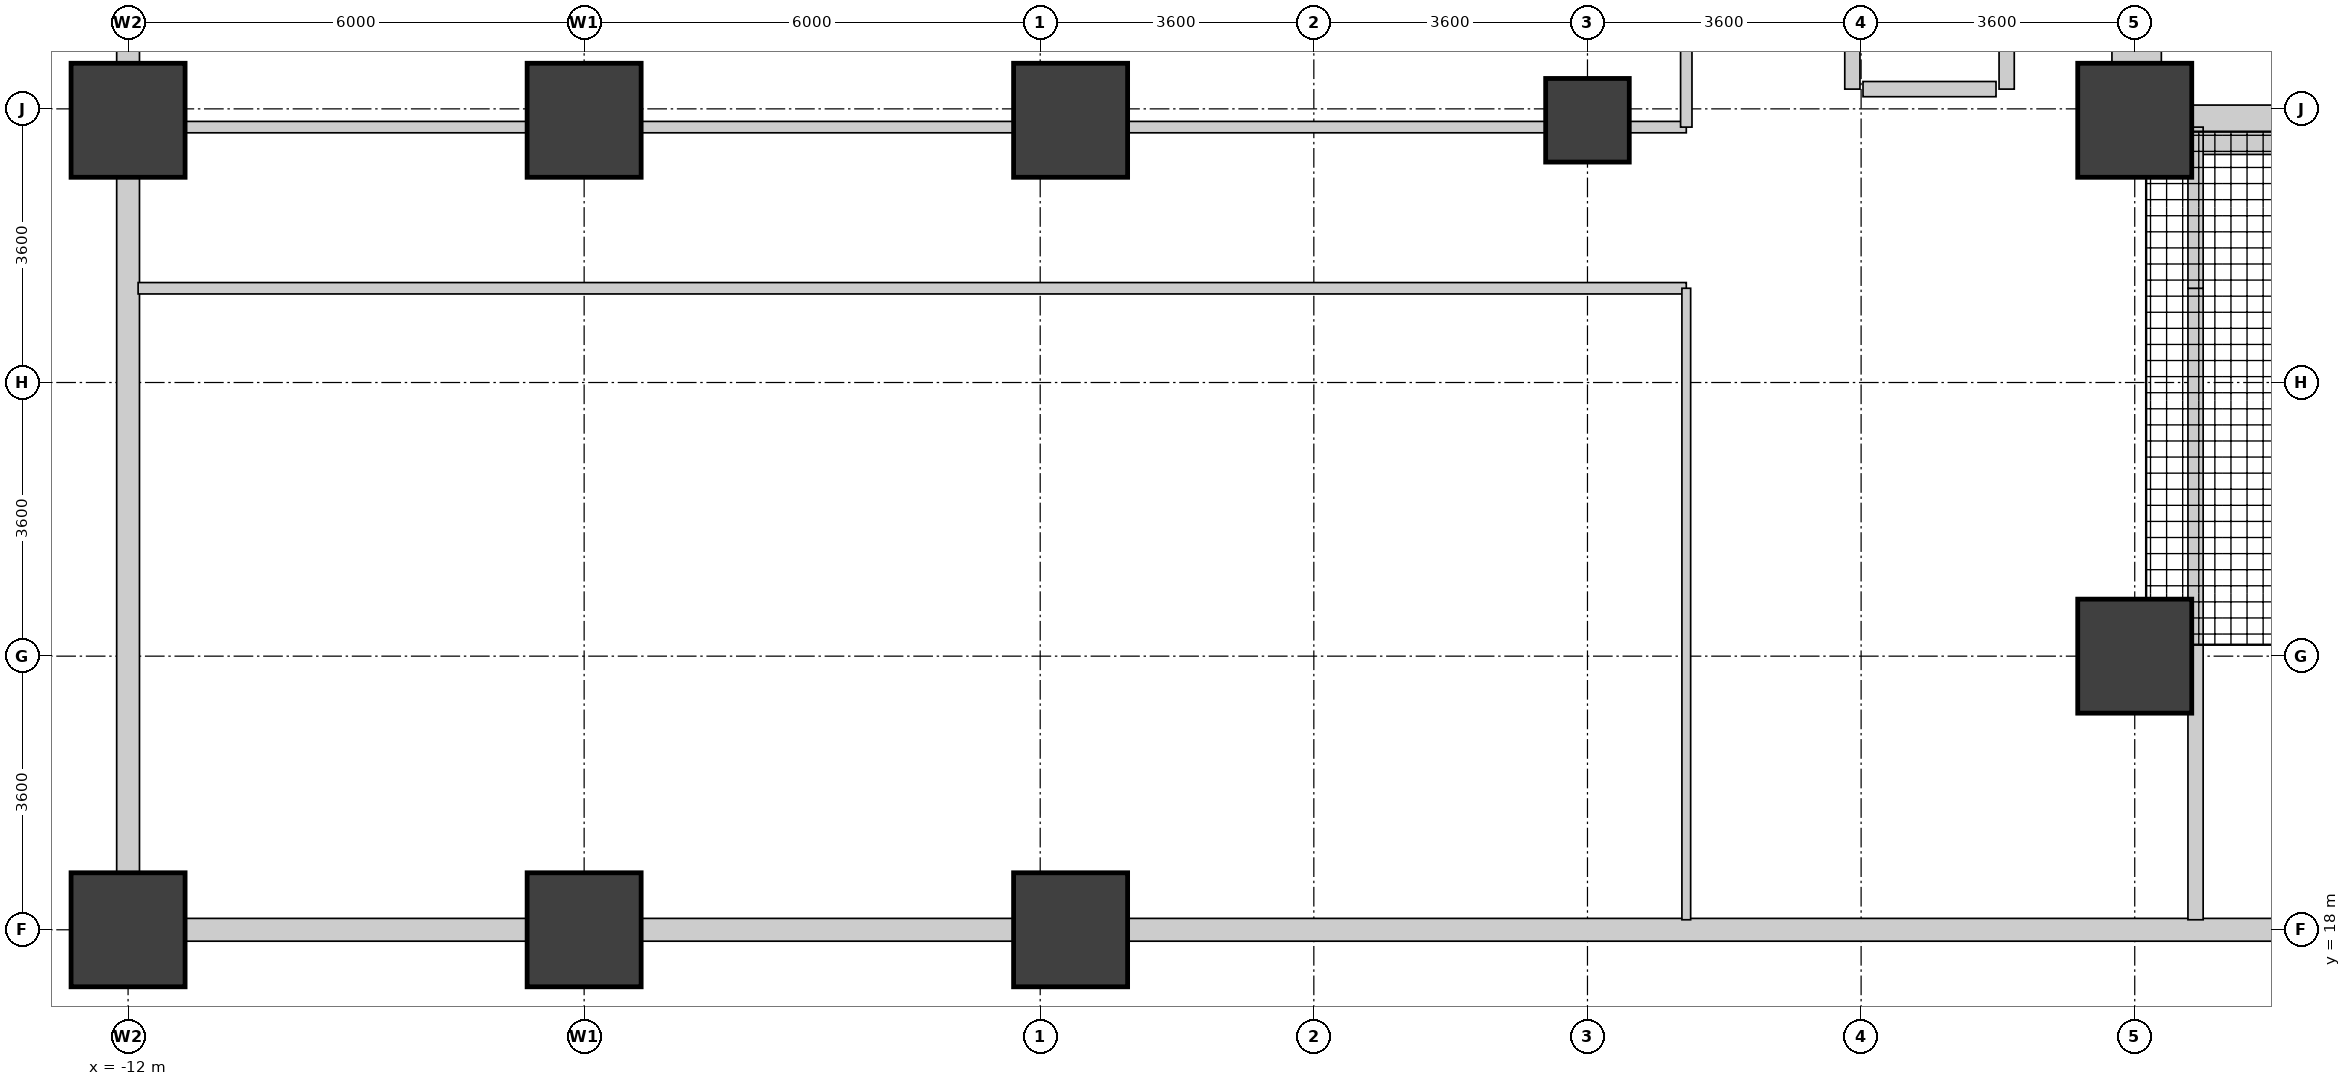
"""IFC4 building model, lengths in metres.
Left out: names, types, materials, properties, quantities, classifications, styles, units other than length and angle.
Written with IfcOpenShell. Run it as: python <this file> out.ifc"""

import sys

from ifc_helpers import new_model, si_unit, direction, frame, frame_2d, origin, origin_2d, place, context, subcontext, project, spatial, rectangle, circle, extrude, source, transform, mapped, element, fill, save


model = new_model("IFC4")
c1 = context("Model", 3, precision=1e-05, world=origin(), true_north=direction((0.0, 1.0)))
c2 = subcontext(c1, "Body", "Model", "MODEL_VIEW")
j1 = project(units=[si_unit("LENGTHUNIT", "METRE"), si_unit("PLANEANGLEUNIT", "RADIAN")], contexts=[c1])
p1 = place(None, origin())
s1 = spatial("IfcSite", under=j1, at=p1, CompositionType="ELEMENT")
p2 = place(p1, origin())
s2 = spatial("IfcBuilding", under=s1, at=p2, CompositionType="ELEMENT")
p3 = place(p2, origin())
s3 = spatial("IfcBuildingStorey", under=s2, at=p3, CompositionType="ELEMENT", Elevation=0.0)
p4 = place(p3, frame((14.425, 28.2, 0.0), z_axis=(0.0, 0.0, 1.0), x_axis=(0.0, 1.0, 0.0)))
e1 = element("IfcWall", 1, at=p4, inside=s3, PredefinedType="SHEAR", context=c2, shape_type="SweptSolid", body=[
    extrude(rectangle(XDim=8.3, YDim=0.65, at=frame_2d((4.15, 0.0))), origin(), (0.0, 0.0, 1.0), 5.12),
])
p5 = place(p3, frame((14.75, 28.525, 0.0), z_axis=(0.0, 0.0, 1.0), x_axis=(1.0, 0.0, 0.0)))
e2 = element("IfcWall", 2, at=p5, inside=s3, PredefinedType="SHEAR", context=c2, shape_type="SweptSolid", body=[
    extrude(rectangle(XDim=3.2, YDim=0.65, at=frame_2d((1.6, 0.0))), origin(), (0.0, 0.0, 1.0), 5.12),
])
p6 = place(p5, frame((0.85, 0.0, 0.0)))
e3 = element("IfcOpeningElement", 3, at=p6, cuts=e2, PredefinedType="OPENING", context=c2, shape_type="SweptSolid", body=[
    extrude(rectangle(XDim=1.1, YDim=2.08, at=frame_2d((0.55, 1.04))), frame((0.0, 0.335, 0.0), z_axis=(0.0, -1.0, 0.0), x_axis=(1.0, 0.0, 0.0)), (0.0, 0.0, 1.0), 0.67),
])
m1 = source(origin(), c2, "Body", "SweptSolid", [
    extrude(circle(Radius=0.55, at=origin_2d()), origin(), (0.0, 0.0, 1.0), 5.4),
])
p7 = place(p3, frame((7.2, 28.65, 0.0), z_axis=(0.0, 0.0, 1.0), x_axis=(1.0, 0.0, 0.0)))
e4 = element("IfcColumn", 4, at=p7, inside=s3, PredefinedType="COLUMN", context=c2, shape_type="MappedRepresentation", body=[
    mapped(m1, transform((0.0, 0.0, 0.0), x_axis=(1.0, 0.0, 0.0), y_axis=(0.0, 1.0, 0.0), z_axis=(0.0, 0.0, 1.0), scale=1.0)),
])
m2 = source(origin(), c2, "Body", "SweptSolid", [
    extrude(rectangle(XDim=1.5, YDim=1.5, at=origin_2d()), origin(), (0.0, 0.0, 1.0), 5.4),
])
for number, where, z_axis, x_axis in (
    (5, (14.4, 21.6, 0.0), (0.0, 0.0, 1.0), (1.0, 0.0, 0.0)),
    (6, (14.4, 28.65, 0.0), (0.0, 0.0, 1.0), (1.0, 0.0, 0.0)),
    (7, (0.4, 18.0, 0.0), (0.0, 0.0, 1.0), (1.0, 0.0, 0.0)),
    (8, (0.4, 28.65, 0.0), (0.0, 0.0, 1.0), (1.0, 0.0, 0.0)),
    (9, (-12.0, 18.0, 0.0), (0.0, 0.0, 1.0), (1.0, 0.0, 0.0)),
    (10, (-12.0, 28.65, 0.0), (0.0, 0.0, 1.0), (1.0, 0.0, 0.0)),
    (11, (-6.0, 18.0, 0.0), (0.0, 0.0, 1.0), (1.0, 0.0, 0.0)),
    (12, (-6.0, 28.65, 0.0), (0.0, 0.0, 1.0), (1.0, 0.0, 0.0)),
):
    element("IfcColumn", number, at=place(p3, frame(where, z_axis=z_axis, x_axis=x_axis)), inside=s3, PredefinedType="COLUMN", context=c2, shape_type="MappedRepresentation", body=[
        mapped(m2, transform((0.0, 0.0, 0.0), x_axis=(1.0, 0.0, 0.0), y_axis=(0.0, 1.0, 0.0), z_axis=(0.0, 0.0, 1.0), scale=1.0)),
    ])
p8 = place(p3, frame((-12.0, 29.401, 0.0), z_axis=(0.0, 0.0, 1.0), x_axis=(0.0, 1.0, 0.0)))
e13 = element("IfcWall", 13, at=p8, inside=s3, PredefinedType="STANDARD", context=c2, shape_type="SweptSolid", body=[
    extrude(rectangle(XDim=5.998, YDim=0.3, at=frame_2d((2.999, 0.0))), origin(), (0.0, 0.0, 1.0), 4.5),
])
p9 = place(p8, frame((2.074, 0.0, 0.0)))
e14 = element("IfcOpeningElement", 14, at=p9, cuts=e13, PredefinedType="OPENING", context=c2, shape_type="SweptSolid", body=[
    extrude(rectangle(XDim=1.85, YDim=2.25, at=frame_2d((0.925, 1.125))), frame((0.0, 0.16, 0.0), z_axis=(0.0, -1.0, 0.0), x_axis=(1.0, 0.0, 0.0)), (0.0, 0.0, 1.0), 0.32),
])
p10 = place(p3, frame((-12.0, 18.751, 0.0), z_axis=(0.0, 0.0, 1.0), x_axis=(0.0, 1.0, 0.0)))
e15 = element("IfcWall", 15, at=p10, inside=s3, PredefinedType="STANDARD", context=c2, shape_type="SweptSolid", body=[
    extrude(rectangle(XDim=9.148, YDim=0.3, at=frame_2d((4.574, 0.0))), origin(), (0.0, 0.0, 1.0), 4.5),
])
p11 = place(p10, frame((0.325, 0.0, 0.9)))
e16 = element("IfcOpeningElement", 16, at=p11, cuts=e15, PredefinedType="OPENING", context=c2, shape_type="SweptSolid", body=[
    extrude(rectangle(XDim=2.4, YDim=2.5, at=frame_2d((1.2, 1.25))), frame((0.0, 0.16, 0.0), z_axis=(0.0, -1.0, 0.0), x_axis=(1.0, 0.0, 0.0)), (0.0, 0.0, 1.0), 0.32),
])
p12 = place(p10, frame((3.374, 0.0, 0.9)))
e17 = element("IfcOpeningElement", 17, at=p12, cuts=e15, PredefinedType="OPENING", context=c2, shape_type="SweptSolid", body=[
    extrude(rectangle(XDim=2.4, YDim=2.5, at=frame_2d((1.2, 1.25))), frame((0.0, 0.16, 0.0), z_axis=(0.0, -1.0, 0.0), x_axis=(1.0, 0.0, 0.0)), (0.0, 0.0, 1.0), 0.32),
])
p13 = place(p3, frame((-6.751, 18.0, 0.0), z_axis=(0.0, 0.0, 1.0), x_axis=(-1.0, 0.0, 0.0)))
e18 = element("IfcWall", 18, at=p13, inside=s3, PredefinedType="STANDARD", context=c2, shape_type="SweptSolid", body=[
    extrude(rectangle(XDim=4.498, YDim=0.3, at=frame_2d((2.249, 0.0))), origin(), (0.0, 0.0, 1.0), 4.4),
])
p14 = place(p13, frame((1.274, 0.0, 0.0)))
e19 = element("IfcOpeningElement", 19, at=p14, cuts=e18, PredefinedType="OPENING", context=c2, shape_type="SweptSolid", body=[
    extrude(rectangle(XDim=1.95, YDim=2.4, at=frame_2d((0.975, 1.2))), frame((0.0, 0.16, 0.0), z_axis=(0.0, -1.0, 0.0), x_axis=(1.0, 0.0, 0.0)), (0.0, 0.0, 1.0), 0.32),
])
p15 = place(p3, frame((-0.351, 18.0, 0.0), z_axis=(0.0, 0.0, 1.0), x_axis=(-1.0, 0.0, 0.0)))
e20 = element("IfcWall", 20, at=p15, inside=s3, PredefinedType="STANDARD", context=c2, shape_type="SweptSolid", body=[
    extrude(rectangle(XDim=4.898, YDim=0.3, at=frame_2d((2.449, 0.0))), origin(), (0.0, 0.0, 1.0), 4.4),
])
p16 = place(p15, frame((1.249, 0.0, 0.9)))
e21 = element("IfcOpeningElement", 21, at=p16, cuts=e20, PredefinedType="OPENING", context=c2, shape_type="SweptSolid", body=[
    extrude(rectangle(XDim=2.4, YDim=2.5, at=frame_2d((1.2, 1.25))), frame((0.0, 0.16, 0.0), z_axis=(0.0, -1.0, 0.0), x_axis=(1.0, 0.0, 0.0)), (0.0, 0.0, 1.0), 0.32),
])
p17 = place(p3, frame((21.445, 18.0, 0.0), z_axis=(0.0, 0.0, 1.0), x_axis=(-1.0, 0.0, 0.0)))
e22 = element("IfcWall", 22, at=p17, inside=s3, PredefinedType="STANDARD", context=c2, shape_type="SweptSolid", body=[
    extrude(rectangle(XDim=20.294, YDim=0.3, at=frame_2d((10.147, 0.0))), origin(), (0.0, 0.0, 1.0), 5.1),
])
p18 = place(p17, frame((4.02, 0.0, 0.0)))
e23 = element("IfcOpeningElement", 23, at=p18, cuts=e22, PredefinedType="OPENING", context=c2, shape_type="SweptSolid", body=[
    extrude(rectangle(XDim=1.85, YDim=2.25, at=frame_2d((0.925, 1.125))), frame((0.0, 0.16, 0.0), z_axis=(0.0, -1.0, 0.0), x_axis=(1.0, 0.0, 0.0)), (0.0, 0.0, 1.0), 0.32),
])
p19 = place(p17, frame((1.12, 0.0, 0.0)))
e24 = element("IfcOpeningElement", 24, at=p19, cuts=e22, PredefinedType="OPENING", context=c2, shape_type="SweptSolid", body=[
    extrude(rectangle(XDim=1.95, YDim=2.4, at=frame_2d((0.975, 1.2))), frame((0.0, 0.16, 0.0), z_axis=(0.0, -1.0, 0.0), x_axis=(1.0, 0.0, 0.0)), (0.0, 0.0, 1.0), 0.32),
])
p20 = place(p17, frame((7.256, 0.0, 0.9)))
e25 = element("IfcOpeningElement", 25, at=p20, cuts=e22, PredefinedType="OPENING", context=c2, shape_type="SweptSolid", body=[
    extrude(rectangle(XDim=2.4, YDim=2.5, at=frame_2d((1.2, 1.25))), frame((0.0, 0.16, 0.0), z_axis=(0.0, -1.0, 0.0), x_axis=(1.0, 0.0, 0.0)), (0.0, 0.0, 1.0), 0.32),
])
p21 = place(p17, frame((14.021, 0.0, 0.9)))
e26 = element("IfcOpeningElement", 26, at=p21, cuts=e22, PredefinedType="OPENING", context=c2, shape_type="SweptSolid", body=[
    extrude(rectangle(XDim=2.4, YDim=2.5, at=frame_2d((1.2, 1.25))), frame((0.0, 0.16, 0.0), z_axis=(0.0, -1.0, 0.0), x_axis=(1.0, 0.0, 0.0)), (0.0, 0.0, 1.0), 0.32),
])
p22 = place(p17, frame((17.403, 0.0, 0.9)))
e27 = element("IfcOpeningElement", 27, at=p22, cuts=e22, PredefinedType="OPENING", context=c2, shape_type="SweptSolid", body=[
    extrude(rectangle(XDim=2.4, YDim=2.5, at=frame_2d((1.2, 1.25))), frame((0.0, 0.16, 0.0), z_axis=(0.0, -1.0, 0.0), x_axis=(1.0, 0.0, 0.0)), (0.0, 0.0, 1.0), 0.32),
])
p23 = place(p3, frame((10.825, 29.06, 0.0), z_axis=(0.0, 0.0, 1.0), x_axis=(1.0, 0.0, 0.0)))
e28 = element("IfcWall", 28, at=p23, inside=s3, PredefinedType="PARTITIONING", context=c2, shape_type="SweptSolid", body=[
    extrude(rectangle(XDim=1.75, YDim=0.2, at=frame_2d((0.875, 0.0))), origin(), (0.0, 0.0, 1.0), 5.1),
])
for number, where, z_axis, x_axis in (
    (29, (10.685, 29.06, 0.0), (0.0, 0.0, 1.0), (0.0, 1.0, 0.0)),
    (30, (12.715, 29.06, 0.0), (0.0, 0.0, 1.0), (0.0, 1.0, 0.0)),
):
    element("IfcWall", number, at=place(p3, frame(where, z_axis=z_axis, x_axis=x_axis)), inside=s3, PredefinedType="PARTITIONING", context=c2, shape_type="SweptSolid", body=[
        extrude(rectangle(XDim=2.28, YDim=0.2, at=frame_2d((1.14, 0.0))), origin(), (0.0, 0.0, 1.0), 5.1),
    ])
p24 = place(p3, frame((15.2, 18.132, 0.0), z_axis=(0.0, 0.0, 1.0), x_axis=(0.0, 1.0, 0.0)))
e31 = element("IfcWall", 31, at=p24, inside=s3, PredefinedType="PARTITIONING", context=c2, shape_type="SweptSolid", body=[
    extrude(rectangle(XDim=8.308, YDim=0.2, at=frame_2d((4.154, 0.0))), origin(), (0.0, 0.0, 1.0), 5.1),
])
p25 = place(p3, frame((15.2, 26.44, 0.0), z_axis=(0.0, 0.0, 1.0), x_axis=(0.0, 1.0, 0.0)))
e32 = element("IfcWall", 32, at=p25, inside=s3, PredefinedType="PARTITIONING", context=c2, shape_type="SweptSolid", body=[
    extrude(rectangle(XDim=2.12, YDim=0.2, at=frame_2d((1.06, 0.0))), origin(), (0.0, 0.0, 1.0), 5.1),
])
p26 = place(p3, frame((-11.868, 26.44, 0.0), z_axis=(0.0, 0.0, 1.0), x_axis=(1.0, 0.0, 0.0)))
e33 = element("IfcWall", 33, at=p26, inside=s3, PredefinedType="PARTITIONING", context=c2, shape_type="SweptSolid", body=[
    extrude(rectangle(XDim=20.368, YDim=0.15, at=frame_2d((10.184, 0.0))), origin(), (0.0, 0.0, 1.0), 5.1),
])
p27 = place(p26, frame((9.534, 0.0, 0.0)))
e34 = element("IfcOpeningElement", 34, at=p27, cuts=e33, PredefinedType="OPENING", context=c2, shape_type="SweptSolid", body=[
    extrude(rectangle(XDim=1.3, YDim=2.12, at=frame_2d((0.65, 1.06))), frame((0.0, 0.085, 0.0), z_axis=(0.0, -1.0, 0.0), x_axis=(1.0, 0.0, 0.0)), (0.0, 0.0, 1.0), 0.17),
])
p28 = place(p3, frame((-11.25, 28.56, 0.0), z_axis=(0.0, 0.0, 1.0), x_axis=(1.0, 0.0, 0.0)))
e35 = element("IfcWall", 35, at=p28, inside=s3, PredefinedType="PARTITIONING", context=c2, shape_type="SweptSolid", body=[
    extrude(rectangle(XDim=4.5, YDim=0.15, at=frame_2d((2.25, 0.0))), origin(), (0.0, 0.0, 1.0), 4.4),
])
p29 = place(p28, frame((1.6, 0.0, 0.0)))
e36 = element("IfcOpeningElement", 36, at=p29, cuts=e35, PredefinedType="OPENING", context=c2, shape_type="SweptSolid", body=[
    extrude(rectangle(XDim=1.3, YDim=2.12, at=frame_2d((0.65, 1.06))), frame((0.0, 0.085, 0.0), z_axis=(0.0, -1.0, 0.0), x_axis=(1.0, 0.0, 0.0)), (0.0, 0.0, 1.0), 0.17),
])
p30 = place(p3, frame((-5.25, 28.56, 0.0), z_axis=(0.0, 0.0, 1.0), x_axis=(1.0, 0.0, 0.0)))
e37 = element("IfcWall", 37, at=p30, inside=s3, PredefinedType="PARTITIONING", context=c2, shape_type="SweptSolid", body=[
    extrude(rectangle(XDim=4.9, YDim=0.15, at=frame_2d((2.45, 0.0))), origin(), (0.0, 0.0, 1.0), 4.4),
])
p31 = place(p3, frame((1.15, 28.56, 0.0), z_axis=(0.0, 0.0, 1.0), x_axis=(1.0, 0.0, 0.0)))
e38 = element("IfcWall", 38, at=p31, inside=s3, PredefinedType="PARTITIONING", context=c2, shape_type="SweptSolid", body=[
    extrude(rectangle(XDim=5.5, YDim=0.15, at=frame_2d((2.75, 0.0))), origin(), (0.0, 0.0, 1.0), 4.4),
])
p32 = place(p3, frame((7.75, 28.56, 0.0), z_axis=(0.0, 0.0, 1.0), x_axis=(1.0, 0.0, 0.0)))
e39 = element("IfcWall", 39, at=p32, inside=s3, PredefinedType="PARTITIONING", context=c2, shape_type="SweptSolid", body=[
    extrude(rectangle(XDim=0.75, YDim=0.15, at=frame_2d((0.375, 0.0))), origin(), (0.0, 0.0, 1.0), 4.4),
])
p33 = place(p3, frame((8.5, 28.56, 0.0), z_axis=(0.0, 0.0, 1.0), x_axis=(0.0, 1.0, 0.0)))
e40 = element("IfcWall", 40, at=p33, inside=s3, PredefinedType="PARTITIONING", context=c2, shape_type="SweptSolid", body=[
    extrude(rectangle(XDim=7.68, YDim=0.15, at=frame_2d((3.84, 0.0))), origin(), (0.0, 0.0, 1.0), 5.1),
])
p34 = place(p3, frame((8.5, 18.132, 0.0), z_axis=(0.0, 0.0, 1.0), x_axis=(0.0, 1.0, 0.0)))
e41 = element("IfcWall", 41, at=p34, inside=s3, PredefinedType="PARTITIONING", context=c2, shape_type="SweptSolid", body=[
    extrude(rectangle(XDim=8.308, YDim=0.115, at=frame_2d((4.154, 0.0))), origin(), (0.0, 0.0, 1.0), 5.1),
])
p35 = place(p11, origin())
e42 = element("IfcWindow", 42, at=p35, inside=s3, PartitioningType="SINGLE_PANEL", PredefinedType="WINDOW", context=c2, shape_type="SweptSolid", body=[
    extrude(rectangle(XDim=2.4, YDim=2.5, at=frame_2d((1.2, 1.25))), frame((0.0, 0.03, 0.0), z_axis=(0.0, -1.0, 0.0), x_axis=(1.0, 0.0, 0.0)), (0.0, 0.0, 1.0), 0.06),
])
fill(e16, e42)
p36 = place(p12, origin())
e43 = element("IfcWindow", 43, at=p36, inside=s3, PartitioningType="SINGLE_PANEL", PredefinedType="WINDOW", context=c2, shape_type="SweptSolid", body=[
    extrude(rectangle(XDim=2.4, YDim=2.5, at=frame_2d((1.2, 1.25))), frame((0.0, 0.03, 0.0), z_axis=(0.0, -1.0, 0.0), x_axis=(1.0, 0.0, 0.0)), (0.0, 0.0, 1.0), 0.06),
])
fill(e17, e43)
p37 = place(p14, origin())
e44 = element("IfcDoor", 44, at=p37, inside=s3, OperationType="DOUBLE_DOOR_SINGLE_SWING", PredefinedType="DOOR", context=c2, shape_type="SweptSolid", body=[
    extrude(rectangle(XDim=1.95, YDim=2.4, at=frame_2d((0.975, 1.2))), frame((0.0, 0.025, 0.0), z_axis=(0.0, -1.0, 0.0), x_axis=(1.0, 0.0, 0.0)), (0.0, 0.0, 1.0), 0.05),
])
fill(e19, e44)
p38 = place(p16, origin())
e45 = element("IfcWindow", 45, at=p38, inside=s3, PartitioningType="SINGLE_PANEL", PredefinedType="WINDOW", context=c2, shape_type="SweptSolid", body=[
    extrude(rectangle(XDim=2.4, YDim=2.5, at=frame_2d((1.2, 1.25))), frame((0.0, 0.03, 0.0), z_axis=(0.0, -1.0, 0.0), x_axis=(1.0, 0.0, 0.0)), (0.0, 0.0, 1.0), 0.06),
])
fill(e21, e45)
p39 = place(p18, origin())
e46 = element("IfcDoor", 46, at=p39, inside=s3, OperationType="DOUBLE_DOOR_SINGLE_SWING", PredefinedType="DOOR", context=c2, shape_type="SweptSolid", body=[
    extrude(rectangle(XDim=1.85, YDim=2.25, at=frame_2d((0.925, 1.125))), frame((0.0, 0.025, 0.0), z_axis=(0.0, -1.0, 0.0), x_axis=(1.0, 0.0, 0.0)), (0.0, 0.0, 1.0), 0.05),
])
fill(e23, e46)
p40 = place(p20, origin())
e47 = element("IfcWindow", 47, at=p40, inside=s3, PartitioningType="SINGLE_PANEL", PredefinedType="WINDOW", context=c2, shape_type="SweptSolid", body=[
    extrude(rectangle(XDim=2.4, YDim=2.5, at=frame_2d((1.2, 1.25))), frame((0.0, 0.03, 0.0), z_axis=(0.0, -1.0, 0.0), x_axis=(1.0, 0.0, 0.0)), (0.0, 0.0, 1.0), 0.06),
])
fill(e25, e47)
p41 = place(p21, origin())
e48 = element("IfcWindow", 48, at=p41, inside=s3, PartitioningType="SINGLE_PANEL", PredefinedType="WINDOW", context=c2, shape_type="SweptSolid", body=[
    extrude(rectangle(XDim=2.4, YDim=2.5, at=frame_2d((1.2, 1.25))), frame((0.0, 0.03, 0.0), z_axis=(0.0, -1.0, 0.0), x_axis=(1.0, 0.0, 0.0)), (0.0, 0.0, 1.0), 0.06),
])
fill(e26, e48)
p42 = place(p22, origin())
e49 = element("IfcWindow", 49, at=p42, inside=s3, PartitioningType="SINGLE_PANEL", PredefinedType="WINDOW", context=c2, shape_type="SweptSolid", body=[
    extrude(rectangle(XDim=2.4, YDim=2.5, at=frame_2d((1.2, 1.25))), frame((0.0, 0.03, 0.0), z_axis=(0.0, -1.0, 0.0), x_axis=(1.0, 0.0, 0.0)), (0.0, 0.0, 1.0), 0.06),
])
fill(e27, e49)
p43 = place(p6, origin())
e50 = element("IfcDoor", 50, at=p43, inside=s3, OperationType="SINGLE_SWING_LEFT", PredefinedType="DOOR", context=c2, shape_type="SweptSolid", body=[
    extrude(rectangle(XDim=1.1, YDim=2.08, at=frame_2d((0.55, 1.04))), frame((0.0, 0.025, 0.0), z_axis=(0.0, -1.0, 0.0), x_axis=(1.0, 0.0, 0.0)), (0.0, 0.0, 1.0), 0.05),
])
fill(e3, e50)
p44 = place(p27, origin())
e51 = element("IfcDoor", 51, at=p44, inside=s3, OperationType="DOUBLE_DOOR_SINGLE_SWING", PredefinedType="DOOR", context=c2, shape_type="SweptSolid", body=[
    extrude(rectangle(XDim=1.3, YDim=2.12, at=frame_2d((0.65, 1.06))), frame((0.0, 0.025, 0.0), z_axis=(0.0, -1.0, 0.0), x_axis=(1.0, 0.0, 0.0)), (0.0, 0.0, 1.0), 0.05),
])
fill(e34, e51)
p45 = place(p29, origin())
e52 = element("IfcDoor", 52, at=p45, inside=s3, OperationType="DOUBLE_DOOR_SINGLE_SWING", PredefinedType="DOOR", context=c2, shape_type="SweptSolid", body=[
    extrude(rectangle(XDim=1.3, YDim=2.12, at=frame_2d((0.65, 1.06))), frame((0.0, 0.025, 0.0), z_axis=(0.0, -1.0, 0.0), x_axis=(1.0, 0.0, 0.0)), (0.0, 0.0, 1.0), 0.05),
])
fill(e36, e52)
save(model, sys.argv[1])
